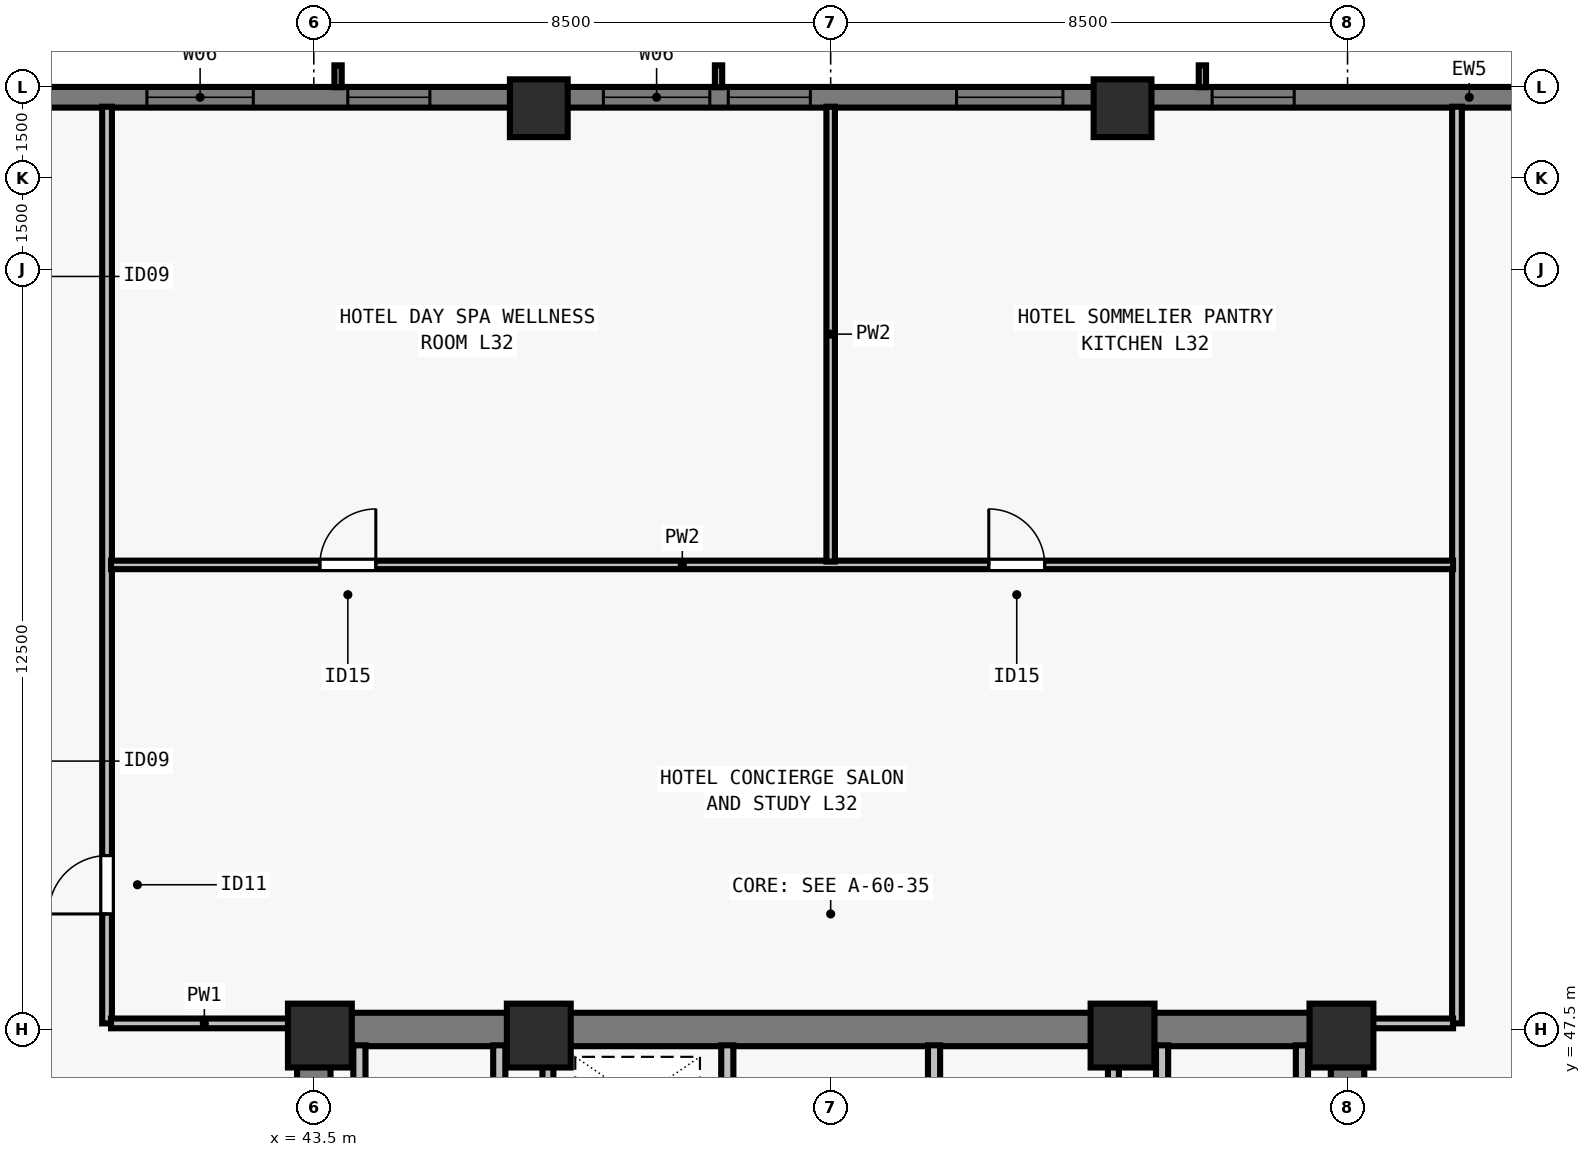
"""IFC4 building model, lengths in metres.
Left out: names, types, materials, properties, quantities, classifications, styles, units other than length and angle.
Written with IfcOpenShell. Run it as: python <this file> out.ifc"""

import sys

from ifc_helpers import new_model, si_unit, direction, frame, frame_2d, origin, origin_2d, place, context, subcontext, project, spatial, rectangle, extrude, element, fill, save


model = new_model("IFC4")
c1 = context("Model", 3, precision=1e-05, world=origin(), true_north=direction((0.0, 1.0)))
c2 = subcontext(c1, "Body", "Model", "MODEL_VIEW")
j1 = project(units=[si_unit("LENGTHUNIT", "METRE"), si_unit("PLANEANGLEUNIT", "RADIAN")], contexts=[c1])
p1 = place(None, origin())
s1 = spatial("IfcSite", under=j1, at=p1, CompositionType="ELEMENT")
p2 = place(p1, origin())
s2 = spatial("IfcBuilding", under=s1, at=p2, CompositionType="ELEMENT")
p3 = place(p2, frame((0.0, 0.0, 120.0)))
s3 = spatial("IfcBuildingStorey", under=s2, at=p3, CompositionType="ELEMENT", Elevation=120.0)
for number, where, z_axis, x_axis in (
    (1, (43.6, 47.4, 0.0), (0.0, 0.0, 1.0), (1.0, 0.0, 0.0)),
    (2, (47.2, 47.4, 0.0), (0.0, 0.0, 1.0), (1.0, 0.0, 0.0)),
    (3, (56.8, 47.4, 0.0), (0.0, 0.0, 1.0), (1.0, 0.0, 0.0)),
    (4, (60.4, 47.4, 0.0), (0.0, 0.0, 1.0), (1.0, 0.0, 0.0)),
):
    element("IfcColumn", number, at=place(p3, frame(where, z_axis=z_axis, x_axis=x_axis)), inside=s3, PredefinedType="COLUMN", context=c2, shape_type="SweptSolid", body=[
        extrude(rectangle(XDim=1.05, YDim=1.05, at=origin_2d()), origin(), (0.0, 0.0, 1.0), 3.5),
    ])
for number, where, z_axis, x_axis in (
    (5, (56.8, 62.65, 0.0), (0.0, 0.0, 1.0), (1.0, 0.0, 0.0)),
    (6, (47.2, 62.65, 0.0), (0.0, 0.0, 1.0), (1.0, 0.0, 0.0)),
):
    element("IfcColumn", number, at=place(p3, frame(where, z_axis=z_axis, x_axis=x_axis)), inside=s3, PredefinedType="COLUMN", context=c2, shape_type="SweptSolid", body=[
        extrude(rectangle(XDim=0.95, YDim=0.95, at=origin_2d()), origin(), (0.0, 0.0, 1.0), 3.5),
    ])
p4 = place(p3, frame((32.0, 62.83, 0.0), z_axis=(0.0, 0.0, 1.0), x_axis=(1.0, 0.0, 0.0)))
e7 = element("IfcWall", 7, at=p4, inside=s3, PredefinedType="SOLIDWALL", context=c2, shape_type="SweptSolid", body=[
    extrude(rectangle(XDim=39.682, YDim=0.34, at=frame_2d((19.841, 0.0))), origin(), (0.0, 0.0, 1.0), 3.28),
])
p5 = place(p4, frame((4.102, 0.0, 0.8)))
e8 = element("IfcOpeningElement", 8, at=p5, cuts=e7, PredefinedType="OPENING", context=c2, shape_type="SweptSolid", body=[
    extrude(rectangle(XDim=1.35, YDim=1.66, at=frame_2d((0.675, 0.83))), frame((0.0, 0.18, 0.0), z_axis=(0.0, -1.0, 0.0), x_axis=(1.0, 0.0, 0.0)), (0.0, 0.0, 1.0), 0.36),
])
p6 = place(p4, frame((8.755, 0.0, 0.8)))
e9 = element("IfcOpeningElement", 9, at=p6, cuts=e7, PredefinedType="OPENING", context=c2, shape_type="SweptSolid", body=[
    extrude(rectangle(XDim=1.75, YDim=1.66, at=frame_2d((0.875, 0.83))), frame((0.0, 0.18, 0.0), z_axis=(0.0, -1.0, 0.0), x_axis=(1.0, 0.0, 0.0)), (0.0, 0.0, 1.0), 0.36),
])
p7 = place(p4, frame((12.059, 0.0, 0.8)))
e10 = element("IfcOpeningElement", 10, at=p7, cuts=e7, PredefinedType="OPENING", context=c2, shape_type="SweptSolid", body=[
    extrude(rectangle(XDim=1.35, YDim=1.66, at=frame_2d((0.675, 0.83))), frame((0.0, 0.18, 0.0), z_axis=(0.0, -1.0, 0.0), x_axis=(1.0, 0.0, 0.0)), (0.0, 0.0, 1.0), 0.36),
])
p8 = place(p4, frame((16.262, 0.0, 0.8)))
e11 = element("IfcOpeningElement", 11, at=p8, cuts=e7, PredefinedType="OPENING", context=c2, shape_type="SweptSolid", body=[
    extrude(rectangle(XDim=1.75, YDim=1.66, at=frame_2d((0.875, 0.83))), frame((0.0, 0.18, 0.0), z_axis=(0.0, -1.0, 0.0), x_axis=(1.0, 0.0, 0.0)), (0.0, 0.0, 1.0), 0.36),
])
p9 = place(p4, frame((18.316, 0.0, 0.8)))
e12 = element("IfcOpeningElement", 12, at=p9, cuts=e7, PredefinedType="OPENING", context=c2, shape_type="SweptSolid", body=[
    extrude(rectangle(XDim=1.35, YDim=1.66, at=frame_2d((0.675, 0.83))), frame((0.0, 0.18, 0.0), z_axis=(0.0, -1.0, 0.0), x_axis=(1.0, 0.0, 0.0)), (0.0, 0.0, 1.0), 0.36),
])
p10 = place(p4, frame((22.07, 0.0, 0.8)))
e13 = element("IfcOpeningElement", 13, at=p10, cuts=e7, PredefinedType="OPENING", context=c2, shape_type="SweptSolid", body=[
    extrude(rectangle(XDim=1.75, YDim=1.66, at=frame_2d((0.875, 0.83))), frame((0.0, 0.18, 0.0), z_axis=(0.0, -1.0, 0.0), x_axis=(1.0, 0.0, 0.0)), (0.0, 0.0, 1.0), 0.36),
])
p11 = place(p4, frame((26.273, 0.0, 0.8)))
e14 = element("IfcOpeningElement", 14, at=p11, cuts=e7, PredefinedType="OPENING", context=c2, shape_type="SweptSolid", body=[
    extrude(rectangle(XDim=1.35, YDim=1.66, at=frame_2d((0.675, 0.83))), frame((0.0, 0.18, 0.0), z_axis=(0.0, -1.0, 0.0), x_axis=(1.0, 0.0, 0.0)), (0.0, 0.0, 1.0), 0.36),
])
p12 = place(p4, frame((33.38, 0.0, 0.8)))
e15 = element("IfcOpeningElement", 15, at=p12, cuts=e7, PredefinedType="OPENING", context=c2, shape_type="SweptSolid", body=[
    extrude(rectangle(XDim=1.35, YDim=1.66, at=frame_2d((0.675, 0.83))), frame((0.0, 0.18, 0.0), z_axis=(0.0, -1.0, 0.0), x_axis=(1.0, 0.0, 0.0)), (0.0, 0.0, 1.0), 0.36),
])
p13 = place(p3, frame((43.225, 47.5, 0.0), z_axis=(0.0, 0.0, 1.0), x_axis=(1.0, 0.0, 0.0)))
e16 = element("IfcWall", 16, at=p13, inside=s3, PredefinedType="SHEAR", context=c2, shape_type="SweptSolid", body=[
    extrude(rectangle(XDim=17.55, YDim=0.55, at=frame_2d((8.775, 0.0))), origin(), (0.0, 0.0, 1.0), 3.28),
])
for number, where, z_axis, x_axis in (
    (17, (43.5, 40.8, 0.0), (0.0, 0.0, 1.0), (0.0, 1.0, 0.0)),
    (18, (60.5, 40.8, 0.0), (0.0, 0.0, 1.0), (0.0, 1.0, 0.0)),
):
    element("IfcWall", number, at=place(p3, frame(where, z_axis=z_axis, x_axis=x_axis)), inside=s3, PredefinedType="SHEAR", context=c2, shape_type="SweptSolid", body=[
        extrude(rectangle(XDim=6.435, YDim=0.55, at=frame_2d((3.218, 0.0))), origin(), (0.0, 0.0, 1.0), 3.28),
    ])
p14 = place(p3, frame((50.3, 40.585, 0.0), z_axis=(0.0, 0.0, 1.0), x_axis=(0.0, 1.0, 0.0)))
e19 = element("IfcWall", 19, at=p14, inside=s3, PredefinedType="SOLIDWALL", context=c2, shape_type="SweptSolid", body=[
    extrude(rectangle(XDim=6.655, YDim=0.2, at=frame_2d((3.328, 0.0))), origin(), (0.0, 0.0, 1.0), 3.28),
])
p15 = place(p14, frame((5.065, 0.0, 0.0)))
e20 = element("IfcOpeningElement", 20, at=p15, cuts=e19, PredefinedType="OPENING", context=c2, shape_type="SweptSolid", body=[
    extrude(rectangle(XDim=0.8, YDim=2.08, at=frame_2d((0.4, 1.04))), frame((0.0, 0.11, 0.0), z_axis=(0.0, -1.0, 0.0), x_axis=(1.0, 0.0, 0.0)), (0.0, 0.0, 1.0), 0.22),
])
p16 = place(p3, frame((53.7, 40.585, 0.0), z_axis=(0.0, 0.0, 1.0), x_axis=(0.0, 1.0, 0.0)))
e21 = element("IfcWall", 21, at=p16, inside=s3, PredefinedType="SOLIDWALL", context=c2, shape_type="SweptSolid", body=[
    extrude(rectangle(XDim=6.655, YDim=0.2, at=frame_2d((3.328, 0.0))), origin(), (0.0, 0.0, 1.0), 3.28),
])
p17 = place(p16, frame((0.195, 0.0, 0.0)))
e22 = element("IfcOpeningElement", 22, at=p17, cuts=e21, PredefinedType="OPENING", context=c2, shape_type="SweptSolid", body=[
    extrude(rectangle(XDim=0.8, YDim=2.08, at=frame_2d((0.4, 1.04))), frame((0.0, 0.11, 0.0), z_axis=(0.0, -1.0, 0.0), x_axis=(1.0, 0.0, 0.0)), (0.0, 0.0, 1.0), 0.22),
])
p18 = place(p16, frame((4.265, 0.0, 0.0)))
e23 = element("IfcOpeningElement", 23, at=p18, cuts=e21, PredefinedType="OPENING", context=c2, shape_type="SweptSolid", body=[
    extrude(rectangle(XDim=0.95, YDim=2.12, at=frame_2d((0.475, 1.06))), frame((0.0, 0.11, 0.0), z_axis=(0.0, -1.0, 0.0), x_axis=(1.0, 0.0, 0.0)), (0.0, 0.0, 1.0), 0.22),
])
for number, where, z_axis, x_axis in (
    (24, (46.55, 43.735, 0.0), (0.0, 0.0, 1.0), (0.0, 1.0, 0.0)),
    (25, (44.25, 43.735, 0.0), (0.0, 0.0, 1.0), (0.0, 1.0, 0.0)),
    (26, (57.45, 43.735, 0.0), (0.0, 0.0, 1.0), (0.0, 1.0, 0.0)),
    (27, (59.75, 43.735, 0.0), (0.0, 0.0, 1.0), (0.0, 1.0, 0.0)),
):
    element("IfcWall", number, at=place(p3, frame(where, z_axis=z_axis, x_axis=x_axis)), inside=s3, PredefinedType="SOLIDWALL", context=c2, shape_type="SweptSolid", body=[
        extrude(rectangle(XDim=3.505, YDim=0.2, at=frame_2d((1.752, 0.0))), origin(), (0.0, 0.0, 1.0), 3.28),
    ])
for number, where, z_axis, x_axis in (
    (28, (47.35, 43.735, 0.0), (0.0, 0.0, 1.0), (0.0, 1.0, 0.0)),
    (29, (56.65, 43.735, 0.0), (0.0, 0.0, 1.0), (0.0, 1.0, 0.0)),
):
    element("IfcWall", number, at=place(p3, frame(where, z_axis=z_axis, x_axis=x_axis)), inside=s3, PredefinedType="SOLIDWALL", context=c2, shape_type="SweptSolid", body=[
        extrude(rectangle(XDim=3.505, YDim=0.18, at=frame_2d((1.752, 0.0))), origin(), (0.0, 0.0, 1.0), 3.28),
    ])
p19 = place(p3, frame((40.1, 47.6, 0.0), z_axis=(0.0, 0.0, 1.0), x_axis=(0.0, 1.0, 0.0)))
e30 = element("IfcWall", 30, at=p19, inside=s3, PredefinedType="PARTITIONING", context=c2, shape_type="SweptSolid", body=[
    extrude(rectangle(XDim=15.075, YDim=0.16, at=frame_2d((7.538, 0.0))), origin(), (0.0, 0.0, 1.0), 2.555),
])
p20 = place(p19, frame((1.8, 0.0, 0.0)))
e31 = element("IfcOpeningElement", 31, at=p20, cuts=e30, PredefinedType="OPENING", context=c2, shape_type="SweptSolid", body=[
    extrude(rectangle(XDim=0.96, YDim=2.12, at=frame_2d((0.48, 1.06))), frame((0.0, 0.09, 0.0), z_axis=(0.0, -1.0, 0.0), x_axis=(1.0, 0.0, 0.0)), (0.0, 0.0, 1.0), 0.18),
])
p21 = place(p3, frame((40.165, 47.6, 0.0), z_axis=(0.0, 0.0, 1.0), x_axis=(1.0, 0.0, 0.0)))
e32 = element("IfcWall", 32, at=p21, inside=s3, PredefinedType="PARTITIONING", context=c2, shape_type="SweptSolid", body=[
    extrude(rectangle(XDim=3.07, YDim=0.16, at=frame_2d((1.535, 0.0))), origin(), (0.0, 0.0, 1.0), 3.28),
])
p22 = place(p3, frame((62.3, 47.6, 0.0), z_axis=(0.0, 0.0, 1.0), x_axis=(0.0, 1.0, 0.0)))
e33 = element("IfcWall", 33, at=p22, inside=s3, PredefinedType="PARTITIONING", context=c2, shape_type="SweptSolid", body=[
    extrude(rectangle(XDim=15.075, YDim=0.16, at=frame_2d((7.538, 0.0))), origin(), (0.0, 0.0, 1.0), 2.555),
])
p23 = place(p3, frame((60.765, 47.6, 0.0), z_axis=(0.0, 0.0, 1.0), x_axis=(1.0, 0.0, 0.0)))
e34 = element("IfcWall", 34, at=p23, inside=s3, PredefinedType="PARTITIONING", context=c2, shape_type="SweptSolid", body=[
    extrude(rectangle(XDim=1.47, YDim=0.16, at=frame_2d((0.735, 0.0))), origin(), (0.0, 0.0, 1.0), 3.28),
])
p24 = place(p3, frame((40.165, 55.14, 0.0), z_axis=(0.0, 0.0, 1.0), x_axis=(1.0, 0.0, 0.0)))
e35 = element("IfcWall", 35, at=p24, inside=s3, PredefinedType="PARTITIONING", context=c2, shape_type="SweptSolid", body=[
    extrude(rectangle(XDim=22.07, YDim=0.14, at=frame_2d((11.035, 0.0))), origin(), (0.0, 0.0, 1.0), 3.28),
])
p25 = place(p24, frame((3.435, 0.0, 0.0)))
e36 = element("IfcOpeningElement", 36, at=p25, cuts=e35, PredefinedType="OPENING", context=c2, shape_type="SweptSolid", body=[
    extrude(rectangle(XDim=0.92, YDim=2.12, at=frame_2d((0.46, 1.06))), frame((0.0, 0.08, 0.0), z_axis=(0.0, -1.0, 0.0), x_axis=(1.0, 0.0, 0.0)), (0.0, 0.0, 1.0), 0.16),
])
p26 = place(p24, frame((14.435, 0.0, 0.0)))
e37 = element("IfcOpeningElement", 37, at=p26, cuts=e35, PredefinedType="OPENING", context=c2, shape_type="SweptSolid", body=[
    extrude(rectangle(XDim=0.92, YDim=2.12, at=frame_2d((0.46, 1.06))), frame((0.0, 0.08, 0.0), z_axis=(0.0, -1.0, 0.0), x_axis=(1.0, 0.0, 0.0)), (0.0, 0.0, 1.0), 0.16),
])
p27 = place(p3, frame((52.0, 55.195, 0.0), z_axis=(0.0, 0.0, 1.0), x_axis=(0.0, 1.0, 0.0)))
e38 = element("IfcWall", 38, at=p27, inside=s3, PredefinedType="PARTITIONING", context=c2, shape_type="SweptSolid", body=[
    extrude(rectangle(XDim=7.48, YDim=0.14, at=frame_2d((3.74, 0.0))), origin(), (0.0, 0.0, 1.0), 3.28),
])
p28 = place(p6, origin())
e39 = element("IfcWindow", 39, at=p28, inside=s3, PartitioningType="SINGLE_PANEL", PredefinedType="WINDOW", context=c2, shape_type="SweptSolid", body=[
    extrude(rectangle(XDim=1.75, YDim=1.66, at=frame_2d((0.875, 0.83))), frame((0.0, -0.05, 0.0), z_axis=(0.0, -1.0, 0.0), x_axis=(1.0, 0.0, 0.0)), (0.0, 0.0, 1.0), 0.06),
])
fill(e9, e39)
p29 = place(p7, origin())
e40 = element("IfcWindow", 40, at=p29, inside=s3, PartitioningType="SINGLE_PANEL", PredefinedType="WINDOW", context=c2, shape_type="SweptSolid", body=[
    extrude(rectangle(XDim=1.35, YDim=1.66, at=frame_2d((0.675, 0.83))), frame((0.0, -0.05, 0.0), z_axis=(0.0, -1.0, 0.0), x_axis=(1.0, 0.0, 0.0)), (0.0, 0.0, 1.0), 0.06),
])
fill(e10, e40)
p30 = place(p8, origin())
e41 = element("IfcWindow", 41, at=p30, inside=s3, PartitioningType="SINGLE_PANEL", PredefinedType="WINDOW", context=c2, shape_type="SweptSolid", body=[
    extrude(rectangle(XDim=1.75, YDim=1.66, at=frame_2d((0.875, 0.83))), frame((0.0, -0.05, 0.0), z_axis=(0.0, -1.0, 0.0), x_axis=(1.0, 0.0, 0.0)), (0.0, 0.0, 1.0), 0.06),
])
fill(e11, e41)
p31 = place(p9, origin())
e42 = element("IfcWindow", 42, at=p31, inside=s3, PartitioningType="SINGLE_PANEL", PredefinedType="WINDOW", context=c2, shape_type="SweptSolid", body=[
    extrude(rectangle(XDim=1.35, YDim=1.66, at=frame_2d((0.675, 0.83))), frame((0.0, -0.05, 0.0), z_axis=(0.0, -1.0, 0.0), x_axis=(1.0, 0.0, 0.0)), (0.0, 0.0, 1.0), 0.06),
])
fill(e12, e42)
p32 = place(p10, origin())
e43 = element("IfcWindow", 43, at=p32, inside=s3, PartitioningType="SINGLE_PANEL", PredefinedType="WINDOW", context=c2, shape_type="SweptSolid", body=[
    extrude(rectangle(XDim=1.75, YDim=1.66, at=frame_2d((0.875, 0.83))), frame((0.0, -0.05, 0.0), z_axis=(0.0, -1.0, 0.0), x_axis=(1.0, 0.0, 0.0)), (0.0, 0.0, 1.0), 0.06),
])
fill(e13, e43)
p33 = place(p11, origin())
e44 = element("IfcWindow", 44, at=p33, inside=s3, PartitioningType="SINGLE_PANEL", PredefinedType="WINDOW", context=c2, shape_type="SweptSolid", body=[
    extrude(rectangle(XDim=1.35, YDim=1.66, at=frame_2d((0.675, 0.83))), frame((0.0, -0.05, 0.0), z_axis=(0.0, -1.0, 0.0), x_axis=(1.0, 0.0, 0.0)), (0.0, 0.0, 1.0), 0.06),
])
fill(e14, e44)
p34 = place(p20, origin())
e45 = element("IfcDoor", 45, at=p34, inside=s3, OperationType="SINGLE_SWING_LEFT", PredefinedType="DOOR", context=c2, shape_type="SweptSolid", body=[
    extrude(rectangle(XDim=0.96, YDim=2.12, at=frame_2d((0.48, 1.06))), frame((0.0, 0.025, 0.0), z_axis=(0.0, -1.0, 0.0), x_axis=(1.0, 0.0, 0.0)), (0.0, 0.0, 1.0), 0.05),
])
fill(e31, e45)
p35 = place(p25, origin())
e46 = element("IfcDoor", 46, at=p35, inside=s3, OperationType="SINGLE_SWING_RIGHT", PredefinedType="DOOR", context=c2, shape_type="SweptSolid", body=[
    extrude(rectangle(XDim=0.92, YDim=2.12, at=frame_2d((0.46, 1.06))), frame((0.0, 0.025, 0.0), z_axis=(0.0, -1.0, 0.0), x_axis=(1.0, 0.0, 0.0)), (0.0, 0.0, 1.0), 0.05),
])
fill(e36, e46)
p36 = place(p26, origin())
e47 = element("IfcDoor", 47, at=p36, inside=s3, OperationType="SINGLE_SWING_LEFT", PredefinedType="DOOR", context=c2, shape_type="SweptSolid", body=[
    extrude(rectangle(XDim=0.92, YDim=2.12, at=frame_2d((0.46, 1.06))), frame((0.0, 0.025, 0.0), z_axis=(0.0, -1.0, 0.0), x_axis=(1.0, 0.0, 0.0)), (0.0, 0.0, 1.0), 0.05),
])
fill(e37, e47)
save(model, sys.argv[1])
